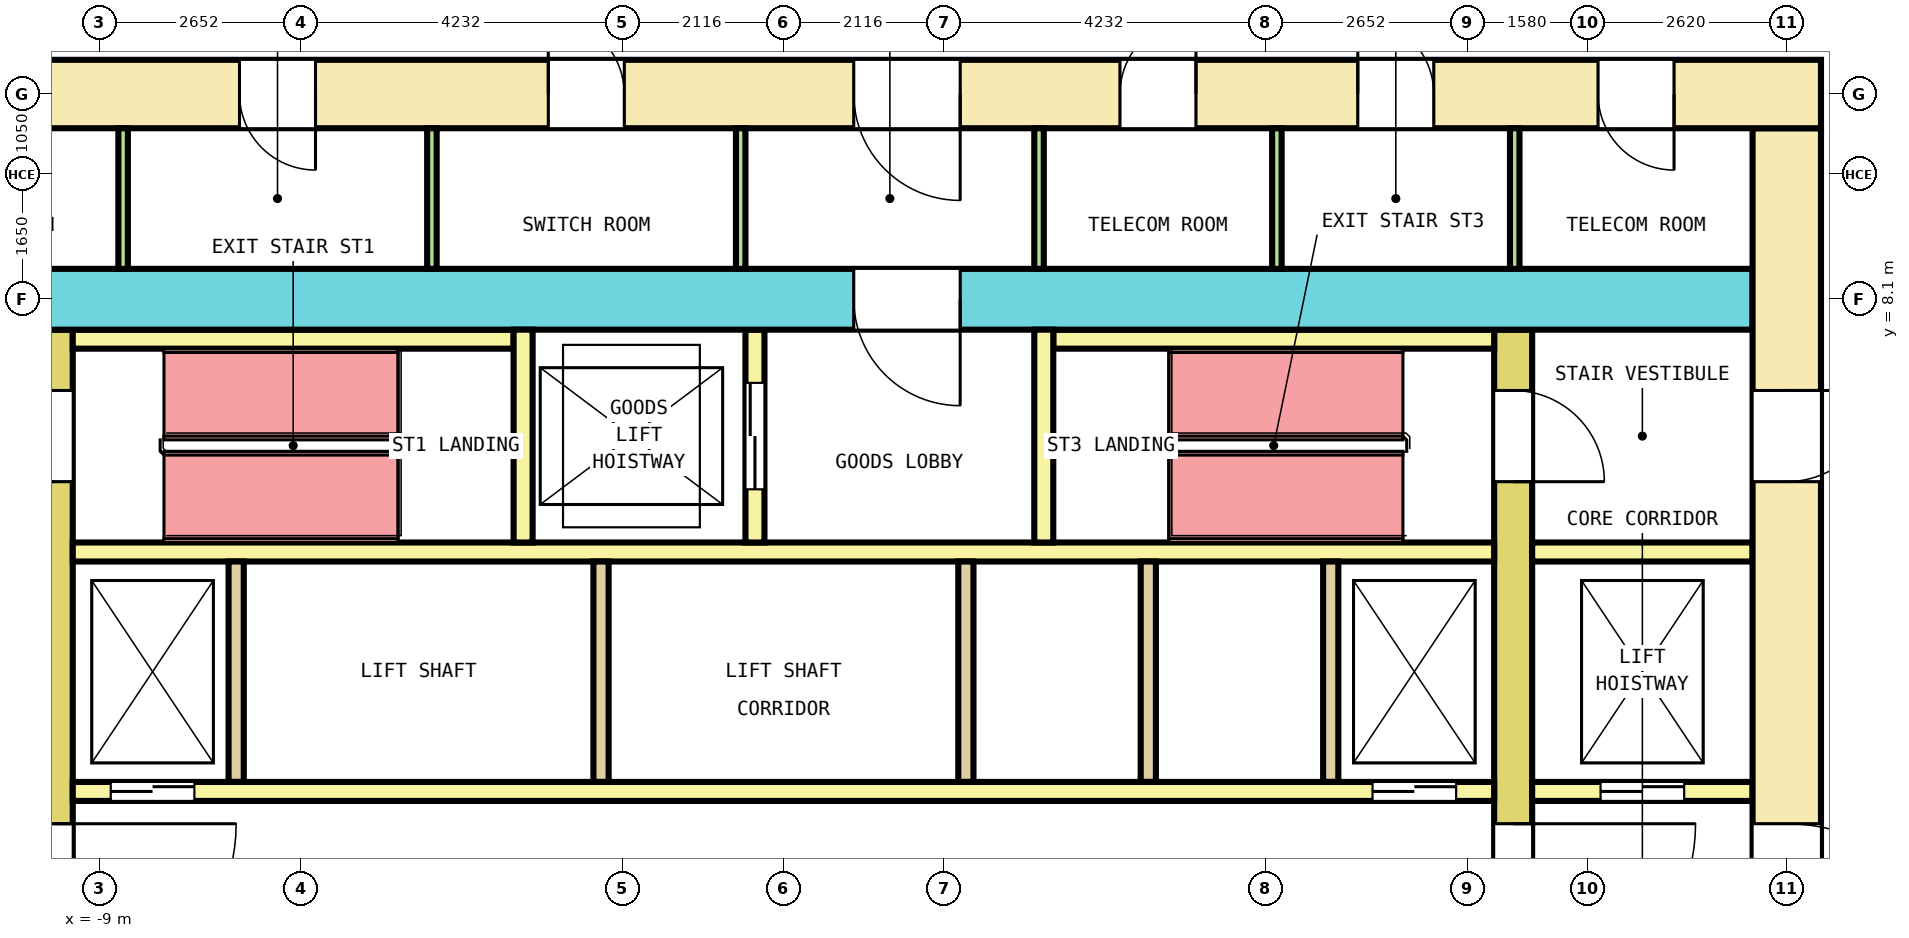
"""IFC4 building model, lengths in metres.
Left out: names, types, materials, properties, quantities, classifications, styles, units other than length and angle.
Written with IfcOpenShell. Run it as: python <this file> out.ifc"""

import sys

from ifc_helpers import new_model, si_unit, direction, frame, frame_2d, origin, place, context, subcontext, project, spatial, rectangle, extrude, element, fill, save


model = new_model("IFC4")
c1 = context("Model", 3, precision=1e-05, world=origin(), true_north=direction((0.0, 1.0)))
c2 = subcontext(c1, "Body", "Model", "MODEL_VIEW")
j1 = project(units=[si_unit("LENGTHUNIT", "METRE"), si_unit("PLANEANGLEUNIT", "RADIAN")], contexts=[c1])
p1 = place(None, origin())
s1 = spatial("IfcSite", under=j1, at=p1, CompositionType="ELEMENT")
p2 = place(p1, origin())
s2 = spatial("IfcBuilding", under=s1, at=p2, CompositionType="ELEMENT")
p3 = place(p2, frame((0.0, 0.0, 49.8)))
s3 = spatial("IfcBuildingStorey", under=s2, at=p3, CompositionType="ELEMENT", Elevation=49.8)
p4 = place(p3, frame((-13.65, 10.8, 0.0), z_axis=(0.0, 0.0, 1.0), x_axis=(1.0, 0.0, 0.0)))
e1 = element("IfcWall", 1, at=p4, inside=s3, PredefinedType="SHEAR", context=c2, shape_type="SweptSolid", body=[
    extrude(rectangle(XDim=27.3, YDim=0.9, at=frame_2d((13.65, 0.0))), origin(), (0.0, 0.0, 1.0), 4.1),
])
p5 = place(p4, frame((2.4, 0.0, 0.0)))
e2 = element("IfcOpeningElement", 2, at=p5, cuts=e1, PredefinedType="OPENING", context=c2, shape_type="SweptSolid", body=[
    extrude(rectangle(XDim=1.0, YDim=2.1, at=frame_2d((0.5, 1.05))), frame((0.0, 0.46, 0.0), z_axis=(0.0, -1.0, 0.0), x_axis=(1.0, 0.0, 0.0)), (0.0, 0.0, 1.0), 0.92),
])
p6 = place(p4, frame((6.494, 0.0, 0.0)))
e3 = element("IfcOpeningElement", 3, at=p6, cuts=e1, PredefinedType="OPENING", context=c2, shape_type="SweptSolid", body=[
    extrude(rectangle(XDim=1.0, YDim=2.1, at=frame_2d((0.5, 1.05))), frame((0.0, 0.46, 0.0), z_axis=(0.0, -1.0, 0.0), x_axis=(1.0, 0.0, 0.0)), (0.0, 0.0, 1.0), 0.92),
])
p7 = place(p4, frame((10.556, 0.0, 0.0)))
e4 = element("IfcOpeningElement", 4, at=p7, cuts=e1, PredefinedType="OPENING", context=c2, shape_type="SweptSolid", body=[
    extrude(rectangle(XDim=1.0, YDim=2.1, at=frame_2d((0.5, 1.05))), frame((0.0, 0.46, 0.0), z_axis=(0.0, -1.0, 0.0), x_axis=(1.0, 0.0, 0.0)), (0.0, 0.0, 1.0), 0.92),
])
p8 = place(p4, frame((18.077, 0.0, 0.0)))
e5 = element("IfcOpeningElement", 5, at=p8, cuts=e1, PredefinedType="OPENING", context=c2, shape_type="SweptSolid", body=[
    extrude(rectangle(XDim=1.0, YDim=2.1, at=frame_2d((0.5, 1.05))), frame((0.0, 0.46, 0.0), z_axis=(0.0, -1.0, 0.0), x_axis=(1.0, 0.0, 0.0)), (0.0, 0.0, 1.0), 0.92),
])
p9 = place(p4, frame((21.206, 0.0, 0.0)))
e6 = element("IfcOpeningElement", 6, at=p9, cuts=e1, PredefinedType="OPENING", context=c2, shape_type="SweptSolid", body=[
    extrude(rectangle(XDim=1.0, YDim=2.1, at=frame_2d((0.5, 1.05))), frame((0.0, 0.46, 0.0), z_axis=(0.0, -1.0, 0.0), x_axis=(1.0, 0.0, 0.0)), (0.0, 0.0, 1.0), 0.92),
])
p10 = place(p4, frame((24.367, 0.0, 0.0)))
e7 = element("IfcOpeningElement", 7, at=p10, cuts=e1, PredefinedType="OPENING", context=c2, shape_type="SweptSolid", body=[
    extrude(rectangle(XDim=1.0, YDim=2.1, at=frame_2d((0.5, 1.05))), frame((0.0, 0.46, 0.0), z_axis=(0.0, -1.0, 0.0), x_axis=(1.0, 0.0, 0.0)), (0.0, 0.0, 1.0), 0.92),
])
p11 = place(p4, frame((14.575, 0.0, 0.0)))
e8 = element("IfcOpeningElement", 8, at=p11, cuts=e1, PredefinedType="OPENING", context=c2, shape_type="SweptSolid", body=[
    extrude(rectangle(XDim=1.4, YDim=2.1, at=frame_2d((0.7, 1.05))), frame((0.0, 0.46, 0.0), z_axis=(0.0, -1.0, 0.0), x_axis=(1.0, 0.0, 0.0)), (0.0, 0.0, 1.0), 0.92),
])
p12 = place(p3, frame((13.2, -10.35, 0.0), z_axis=(0.0, 0.0, 1.0), x_axis=(0.0, 1.0, 0.0)))
e9 = element("IfcWall", 9, at=p12, inside=s3, PredefinedType="SHEAR", context=c2, shape_type="SweptSolid", body=[
    extrude(rectangle(XDim=20.7, YDim=0.9, at=frame_2d((10.35, 0.0))), origin(), (0.0, 0.0, 1.0), 4.1),
])
p13 = place(p12, frame((9.15, 0.0, 0.0)))
e10 = element("IfcOpeningElement", 10, at=p13, cuts=e9, PredefinedType="OPENING", context=c2, shape_type="SweptSolid", body=[
    extrude(rectangle(XDim=2.4, YDim=2.1, at=frame_2d((1.2, 1.05))), frame((0.0, 0.46, 0.0), z_axis=(0.0, -1.0, 0.0), x_axis=(1.0, 0.0, 0.0)), (0.0, 0.0, 1.0), 0.92),
])
p14 = place(p12, frame((16.05, 0.0, 0.0)))
e11 = element("IfcOpeningElement", 11, at=p14, cuts=e9, PredefinedType="OPENING", context=c2, shape_type="SweptSolid", body=[
    extrude(rectangle(XDim=1.2, YDim=2.1, at=frame_2d((0.6, 1.05))), frame((0.0, 0.46, 0.0), z_axis=(0.0, -1.0, 0.0), x_axis=(1.0, 0.0, 0.0)), (0.0, 0.0, 1.0), 0.92),
])
p15 = place(p12, frame((3.55, 0.0, 0.0)))
e12 = element("IfcOpeningElement", 12, at=p15, cuts=e9, PredefinedType="OPENING", context=c2, shape_type="SweptSolid", body=[
    extrude(rectangle(XDim=1.0, YDim=2.1, at=frame_2d((0.5, 1.05))), frame((0.0, 0.46, 0.0), z_axis=(0.0, -1.0, 0.0), x_axis=(1.0, 0.0, 0.0)), (0.0, 0.0, 1.0), 0.92),
])
p16 = place(p3, frame((-12.75, 8.1, 0.0), z_axis=(0.0, 0.0, 1.0), x_axis=(1.0, 0.0, 0.0)))
e13 = element("IfcWall", 13, at=p16, inside=s3, PredefinedType="SHEAR", context=c2, shape_type="SweptSolid", body=[
    extrude(rectangle(XDim=25.5, YDim=0.8, at=frame_2d((12.75, 0.0))), origin(), (0.0, 0.0, 1.0), 4.1),
])
p17 = place(p16, frame((13.675, 0.0, 0.0)))
e14 = element("IfcOpeningElement", 14, at=p17, cuts=e13, PredefinedType="OPENING", context=c2, shape_type="SweptSolid", body=[
    extrude(rectangle(XDim=1.4, YDim=2.1, at=frame_2d((0.7, 1.05))), frame((0.0, 0.41, 0.0), z_axis=(0.0, -1.0, 0.0), x_axis=(1.0, 0.0, 0.0)), (0.0, 0.0, 1.0), 0.82),
])
p18 = place(p3, frame((-9.6, -7.7, 0.0), z_axis=(0.0, 0.0, 1.0), x_axis=(0.0, 1.0, 0.0)))
e15 = element("IfcWall", 15, at=p18, inside=s3, PredefinedType="SHEAR", context=c2, shape_type="SweptSolid", body=[
    extrude(rectangle(XDim=15.4, YDim=0.5, at=frame_2d((7.7, 0.0))), origin(), (0.0, 0.0, 1.0), 4.1),
])
p19 = place(p18, frame((6.5, 0.0, 0.0)))
e16 = element("IfcOpeningElement", 16, at=p19, cuts=e15, PredefinedType="OPENING", context=c2, shape_type="SweptSolid", body=[
    extrude(rectangle(XDim=2.4, YDim=2.1, at=frame_2d((1.2, 1.05))), frame((0.0, 0.26, 0.0), z_axis=(0.0, -1.0, 0.0), x_axis=(1.0, 0.0, 0.0)), (0.0, 0.0, 1.0), 0.52),
])
p20 = place(p18, frame((13.4, 0.0, 0.0)))
e17 = element("IfcOpeningElement", 17, at=p20, cuts=e15, PredefinedType="OPENING", context=c2, shape_type="SweptSolid", body=[
    extrude(rectangle(XDim=1.2, YDim=2.1, at=frame_2d((0.6, 1.05))), frame((0.0, 0.26, 0.0), z_axis=(0.0, -1.0, 0.0), x_axis=(1.0, 0.0, 0.0)), (0.0, 0.0, 1.0), 0.52),
])
p21 = place(p18, frame((0.8, 0.0, 0.0)))
e18 = element("IfcOpeningElement", 18, at=p21, cuts=e15, PredefinedType="OPENING", context=c2, shape_type="SweptSolid", body=[
    extrude(rectangle(XDim=1.2, YDim=2.1, at=frame_2d((0.6, 1.05))), frame((0.0, 0.26, 0.0), z_axis=(0.0, -1.0, 0.0), x_axis=(1.0, 0.0, 0.0)), (0.0, 0.0, 1.0), 0.52),
])
p22 = place(p3, frame((9.6, -7.7, 0.0), z_axis=(0.0, 0.0, 1.0), x_axis=(0.0, 1.0, 0.0)))
e19 = element("IfcWall", 19, at=p22, inside=s3, PredefinedType="SHEAR", context=c2, shape_type="SweptSolid", body=[
    extrude(rectangle(XDim=15.4, YDim=0.5, at=frame_2d((7.7, 0.0))), origin(), (0.0, 0.0, 1.0), 4.1),
])
p23 = place(p22, frame((6.5, 0.0, 0.0)))
e20 = element("IfcOpeningElement", 20, at=p23, cuts=e19, PredefinedType="OPENING", context=c2, shape_type="SweptSolid", body=[
    extrude(rectangle(XDim=2.4, YDim=2.1, at=frame_2d((1.2, 1.05))), frame((0.0, 0.26, 0.0), z_axis=(0.0, -1.0, 0.0), x_axis=(1.0, 0.0, 0.0)), (0.0, 0.0, 1.0), 0.52),
])
p24 = place(p22, frame((13.4, 0.0, 0.0)))
e21 = element("IfcOpeningElement", 21, at=p24, cuts=e19, PredefinedType="OPENING", context=c2, shape_type="SweptSolid", body=[
    extrude(rectangle(XDim=1.2, YDim=2.1, at=frame_2d((0.6, 1.05))), frame((0.0, 0.26, 0.0), z_axis=(0.0, -1.0, 0.0), x_axis=(1.0, 0.0, 0.0)), (0.0, 0.0, 1.0), 0.52),
])
p25 = place(p22, frame((0.9, 0.0, 0.0)))
e22 = element("IfcOpeningElement", 22, at=p25, cuts=e19, PredefinedType="OPENING", context=c2, shape_type="SweptSolid", body=[
    extrude(rectangle(XDim=1.0, YDim=2.1, at=frame_2d((0.5, 1.05))), frame((0.0, 0.26, 0.0), z_axis=(0.0, -1.0, 0.0), x_axis=(1.0, 0.0, 0.0)), (0.0, 0.0, 1.0), 0.52),
])
p26 = place(p3, frame((-9.35, 1.625, 0.0), z_axis=(0.0, 0.0, 1.0), x_axis=(1.0, 0.0, 0.0)))
e23 = element("IfcWall", 23, at=p26, inside=s3, PredefinedType="SOLIDWALL", context=c2, shape_type="SweptSolid", body=[
    extrude(rectangle(XDim=18.7, YDim=0.25, at=frame_2d((9.35, 0.0))), origin(), (0.0, 0.0, 1.0), 4.1),
])
p27 = place(p26, frame((0.5, 0.0, 0.0)))
e24 = element("IfcOpeningElement", 24, at=p27, cuts=e23, PredefinedType="OPENING", context=c2, shape_type="SweptSolid", body=[
    extrude(rectangle(XDim=1.1, YDim=2.1, at=frame_2d((0.55, 1.05))), frame((0.0, 0.135, 0.0), z_axis=(0.0, -1.0, 0.0), x_axis=(1.0, 0.0, 0.0)), (0.0, 0.0, 1.0), 0.27),
])
p28 = place(p26, frame((17.1, 0.0, 0.0)))
e25 = element("IfcOpeningElement", 25, at=p28, cuts=e23, PredefinedType="OPENING", context=c2, shape_type="SweptSolid", body=[
    extrude(rectangle(XDim=1.1, YDim=2.1, at=frame_2d((0.55, 1.05))), frame((0.0, 0.135, 0.0), z_axis=(0.0, -1.0, 0.0), x_axis=(1.0, 0.0, 0.0)), (0.0, 0.0, 1.0), 0.27),
])
p29 = place(p3, frame((9.85, 1.625, 0.0), z_axis=(0.0, 0.0, 1.0), x_axis=(1.0, 0.0, 0.0)))
e26 = element("IfcWall", 26, at=p29, inside=s3, PredefinedType="SOLIDWALL", context=c2, shape_type="SweptSolid", body=[
    extrude(rectangle(XDim=2.9, YDim=0.25, at=frame_2d((1.45, 0.0))), origin(), (0.0, 0.0, 1.0), 4.1),
])
p30 = place(p29, frame((0.9, 0.0, 0.0)))
e27 = element("IfcOpeningElement", 27, at=p30, cuts=e26, PredefinedType="OPENING", context=c2, shape_type="SweptSolid", body=[
    extrude(rectangle(XDim=1.1, YDim=2.1, at=frame_2d((0.55, 1.05))), frame((0.0, 0.135, 0.0), z_axis=(0.0, -1.0, 0.0), x_axis=(1.0, 0.0, 0.0)), (0.0, 0.0, 1.0), 0.27),
])
p31 = place(p3, frame((-9.35, 4.775, 0.0), z_axis=(0.0, 0.0, 1.0), x_axis=(1.0, 0.0, 0.0)))
e28 = element("IfcWall", 28, at=p31, inside=s3, PredefinedType="SOLIDWALL", context=c2, shape_type="SweptSolid", body=[
    extrude(rectangle(XDim=18.7, YDim=0.25, at=frame_2d((9.35, 0.0))), origin(), (0.0, 0.0, 1.0), 4.1),
])
p32 = place(p3, frame((9.85, 4.775, 0.0), z_axis=(0.0, 0.0, 1.0), x_axis=(1.0, 0.0, 0.0)))
e29 = element("IfcWall", 29, at=p32, inside=s3, PredefinedType="SOLIDWALL", context=c2, shape_type="SweptSolid", body=[
    extrude(rectangle(XDim=2.9, YDim=0.25, at=frame_2d((1.45, 0.0))), origin(), (0.0, 0.0, 1.0), 4.1),
])
for number, where, z_axis, x_axis in (
    (30, (-7.2, 1.75, 0.0), (0.0, 0.0, 1.0), (0.0, 1.0, 0.0)),
    (31, (-2.4, 1.75, 0.0), (0.0, 0.0, 1.0), (0.0, 1.0, 0.0)),
    (32, (2.4, 1.75, 0.0), (0.0, 0.0, 1.0), (0.0, 1.0, 0.0)),
    (33, (4.8, 1.75, 0.0), (0.0, 0.0, 1.0), (0.0, 1.0, 0.0)),
    (34, (7.2, 1.75, 0.0), (0.0, 0.0, 1.0), (0.0, 1.0, 0.0)),
):
    element("IfcWall", number, at=place(p3, frame(where, z_axis=z_axis, x_axis=x_axis)), inside=s3, PredefinedType="SOLIDWALL", context=c2, shape_type="SweptSolid", body=[
        extrude(rectangle(XDim=2.9, YDim=0.2, at=frame_2d((1.45, 0.0))), origin(), (0.0, 0.0, 1.0), 4.1),
    ])
for number, where, z_axis, x_axis in (
    (35, (-9.35, 7.575, 0.0), (0.0, 0.0, 1.0), (1.0, 0.0, 0.0)),
    (36, (3.55, 7.575, 0.0), (0.0, 0.0, 1.0), (1.0, 0.0, 0.0)),
):
    element("IfcWall", number, at=place(p3, frame(where, z_axis=z_axis, x_axis=x_axis)), inside=s3, PredefinedType="SOLIDWALL", context=c2, shape_type="SweptSolid", body=[
        extrude(rectangle(XDim=5.8, YDim=0.25, at=frame_2d((2.9, 0.0))), origin(), (0.0, 0.0, 1.0), 4.1),
    ])
p33 = place(p3, frame((-3.425, 4.9, 0.0), z_axis=(0.0, 0.0, 1.0), x_axis=(0.0, 1.0, 0.0)))
e37 = element("IfcWall", 37, at=p33, inside=s3, PredefinedType="SOLIDWALL", context=c2, shape_type="SweptSolid", body=[
    extrude(rectangle(XDim=2.8, YDim=0.25, at=frame_2d((1.4, 0.0))), origin(), (0.0, 0.0, 1.0), 4.1),
])
p34 = place(p3, frame((-0.375, 4.9, 0.0), z_axis=(0.0, 0.0, 1.0), x_axis=(0.0, 1.0, 0.0)))
e38 = element("IfcWall", 38, at=p34, inside=s3, PredefinedType="SOLIDWALL", context=c2, shape_type="SweptSolid", body=[
    extrude(rectangle(XDim=2.8, YDim=0.25, at=frame_2d((1.4, 0.0))), origin(), (0.0, 0.0, 1.0), 4.1),
])
p35 = place(p34, frame((0.7, 0.0, 0.0)))
e39 = element("IfcOpeningElement", 39, at=p35, cuts=e38, PredefinedType="OPENING", context=c2, shape_type="SweptSolid", body=[
    extrude(rectangle(XDim=1.4, YDim=2.1, at=frame_2d((0.7, 1.05))), frame((0.0, 0.135, 0.0), z_axis=(0.0, -1.0, 0.0), x_axis=(1.0, 0.0, 0.0)), (0.0, 0.0, 1.0), 0.27),
])
p36 = place(p3, frame((3.425, 4.9, 0.0), z_axis=(0.0, 0.0, 1.0), x_axis=(0.0, 1.0, 0.0)))
e40 = element("IfcWall", 40, at=p36, inside=s3, PredefinedType="SOLIDWALL", context=c2, shape_type="SweptSolid", body=[
    extrude(rectangle(XDim=2.8, YDim=0.25, at=frame_2d((1.4, 0.0))), origin(), (0.0, 0.0, 1.0), 4.1),
])
for number, where, z_axis, x_axis in (
    (41, (-8.688, 8.5, 0.0), (0.0, 0.0, 1.0), (0.0, 1.0, 0.0)),
    (42, (-4.625, 8.5, 0.0), (0.0, 0.0, 1.0), (0.0, 1.0, 0.0)),
    (43, (-0.562, 8.5, 0.0), (0.0, 0.0, 1.0), (0.0, 1.0, 0.0)),
    (44, (3.363, 8.5, 0.0), (0.0, 0.0, 1.0), (0.0, 1.0, 0.0)),
    (45, (6.492, 8.5, 0.0), (0.0, 0.0, 1.0), (0.0, 1.0, 0.0)),
    (46, (9.621, 8.5, 0.0), (0.0, 0.0, 1.0), (0.0, 1.0, 0.0)),
):
    element("IfcWall", number, at=place(p3, frame(where, z_axis=z_axis, x_axis=x_axis)), inside=s3, PredefinedType="PARTITIONING", context=c2, shape_type="SweptSolid", body=[
        extrude(rectangle(XDim=1.85, YDim=0.125, at=frame_2d((0.925, 0.0))), origin(), (0.0, 0.0, 1.0), 4.1),
    ])
p37 = place(p27, origin())
e47 = element("IfcDoor", 47, at=p37, inside=s3, OperationType="DOUBLE_DOOR_SLIDING", PredefinedType="DOOR", context=c2, shape_type="SweptSolid", body=[
    extrude(rectangle(XDim=1.1, YDim=2.1, at=frame_2d((0.55, 1.05))), frame((0.0, 0.075, 0.0), z_axis=(0.0, -1.0, 0.0), x_axis=(1.0, 0.0, 0.0)), (0.0, 0.0, 1.0), 0.15),
])
fill(e24, e47)
p38 = place(p28, origin())
e48 = element("IfcDoor", 48, at=p38, inside=s3, OperationType="DOUBLE_DOOR_SLIDING", PredefinedType="DOOR", context=c2, shape_type="SweptSolid", body=[
    extrude(rectangle(XDim=1.1, YDim=2.1, at=frame_2d((0.55, 1.05))), frame((0.0, 0.075, 0.0), z_axis=(0.0, -1.0, 0.0), x_axis=(1.0, 0.0, 0.0)), (0.0, 0.0, 1.0), 0.15),
])
fill(e25, e48)
p39 = place(p30, origin())
e49 = element("IfcDoor", 49, at=p39, inside=s3, OperationType="DOUBLE_DOOR_SLIDING", PredefinedType="DOOR", context=c2, shape_type="SweptSolid", body=[
    extrude(rectangle(XDim=1.1, YDim=2.1, at=frame_2d((0.55, 1.05))), frame((0.0, 0.075, 0.0), z_axis=(0.0, -1.0, 0.0), x_axis=(1.0, 0.0, 0.0)), (0.0, 0.0, 1.0), 0.15),
])
fill(e27, e49)
p40 = place(p35, origin())
e50 = element("IfcDoor", 50, at=p40, inside=s3, OperationType="DOUBLE_DOOR_SLIDING", PredefinedType="DOOR", context=c2, shape_type="SweptSolid", body=[
    extrude(rectangle(XDim=1.4, YDim=2.1, at=frame_2d((0.7, 1.05))), frame((0.0, 0.075, 0.0), z_axis=(0.0, -1.0, 0.0), x_axis=(1.0, 0.0, 0.0)), (0.0, 0.0, 1.0), 0.15),
])
fill(e39, e50)
p41 = place(p19, origin())
e51 = element("IfcDoor", 51, at=p41, inside=s3, OperationType="DOUBLE_DOOR_SINGLE_SWING", PredefinedType="DOOR", context=c2, shape_type="SweptSolid", body=[
    extrude(rectangle(XDim=2.4, YDim=2.1, at=frame_2d((1.2, 1.05))), frame((0.0, 0.2, 0.0), z_axis=(0.0, -1.0, 0.0), x_axis=(1.0, 0.0, 0.0)), (0.0, 0.0, 1.0), 0.4),
])
fill(e16, e51)
p42 = place(p23, origin())
e52 = element("IfcDoor", 52, at=p42, inside=s3, OperationType="DOUBLE_DOOR_SINGLE_SWING", PredefinedType="DOOR", context=c2, shape_type="SweptSolid", body=[
    extrude(rectangle(XDim=2.4, YDim=2.1, at=frame_2d((1.2, 1.05))), frame((0.0, 0.2, 0.0), z_axis=(0.0, -1.0, 0.0), x_axis=(1.0, 0.0, 0.0)), (0.0, 0.0, 1.0), 0.4),
])
fill(e20, e52)
p43 = place(p13, origin())
e53 = element("IfcDoor", 53, at=p43, inside=s3, OperationType="DOUBLE_DOOR_SINGLE_SWING", PredefinedType="DOOR", context=c2, shape_type="SweptSolid", body=[
    extrude(rectangle(XDim=2.4, YDim=2.1, at=frame_2d((1.2, 1.05))), frame((0.0, 0.3, 0.0), z_axis=(0.0, -1.0, 0.0), x_axis=(1.0, 0.0, 0.0)), (0.0, 0.0, 1.0), 0.6),
])
fill(e10, e53)
p44 = place(p20, origin())
e54 = element("IfcDoor", 54, at=p44, inside=s3, OperationType="SINGLE_SWING_RIGHT", PredefinedType="DOOR", context=c2, shape_type="SweptSolid", body=[
    extrude(rectangle(XDim=1.2, YDim=2.1, at=frame_2d((0.6, 1.05))), frame((0.0, 0.2, 0.0), z_axis=(0.0, -1.0, 0.0), x_axis=(1.0, 0.0, 0.0)), (0.0, 0.0, 1.0), 0.4),
])
fill(e17, e54)
p45 = place(p24, origin())
e55 = element("IfcDoor", 55, at=p45, inside=s3, OperationType="SINGLE_SWING_RIGHT", PredefinedType="DOOR", context=c2, shape_type="SweptSolid", body=[
    extrude(rectangle(XDim=1.2, YDim=2.1, at=frame_2d((0.6, 1.05))), frame((0.0, 0.2, 0.0), z_axis=(0.0, -1.0, 0.0), x_axis=(1.0, 0.0, 0.0)), (0.0, 0.0, 1.0), 0.4),
])
fill(e21, e55)
p46 = place(p14, origin())
e56 = element("IfcDoor", 56, at=p46, inside=s3, OperationType="SINGLE_SWING_LEFT", PredefinedType="DOOR", context=c2, shape_type="SweptSolid", body=[
    extrude(rectangle(XDim=1.2, YDim=2.1, at=frame_2d((0.6, 1.05))), frame((0.0, 0.3, 0.0), z_axis=(0.0, -1.0, 0.0), x_axis=(1.0, 0.0, 0.0)), (0.0, 0.0, 1.0), 0.6),
])
fill(e11, e56)
p47 = place(p17, origin())
e57 = element("IfcDoor", 57, at=p47, inside=s3, OperationType="DOUBLE_DOOR_SINGLE_SWING", PredefinedType="DOOR", context=c2, shape_type="SweptSolid", body=[
    extrude(rectangle(XDim=1.4, YDim=2.1, at=frame_2d((0.7, 1.05))), frame((0.0, 0.3, 0.0), z_axis=(0.0, -1.0, 0.0), x_axis=(1.0, 0.0, 0.0)), (0.0, 0.0, 1.0), 0.6),
])
fill(e14, e57)
p48 = place(p6, origin())
e58 = element("IfcDoor", 58, at=p48, inside=s3, OperationType="SINGLE_SWING_LEFT", PredefinedType="DOOR", context=c2, shape_type="SweptSolid", body=[
    extrude(rectangle(XDim=1.0, YDim=2.1, at=frame_2d((0.5, 1.05))), frame((0.0, 0.3, 0.0), z_axis=(0.0, -1.0, 0.0), x_axis=(1.0, 0.0, 0.0)), (0.0, 0.0, 1.0), 0.6),
])
fill(e3, e58)
p49 = place(p7, origin())
e59 = element("IfcDoor", 59, at=p49, inside=s3, OperationType="SINGLE_SWING_RIGHT", PredefinedType="DOOR", context=c2, shape_type="SweptSolid", body=[
    extrude(rectangle(XDim=1.0, YDim=2.1, at=frame_2d((0.5, 1.05))), frame((0.0, 0.3, 0.0), z_axis=(0.0, -1.0, 0.0), x_axis=(1.0, 0.0, 0.0)), (0.0, 0.0, 1.0), 0.6),
])
fill(e4, e59)
p50 = place(p8, origin())
e60 = element("IfcDoor", 60, at=p50, inside=s3, OperationType="SINGLE_SWING_LEFT", PredefinedType="DOOR", context=c2, shape_type="SweptSolid", body=[
    extrude(rectangle(XDim=1.0, YDim=2.1, at=frame_2d((0.5, 1.05))), frame((0.0, 0.3, 0.0), z_axis=(0.0, -1.0, 0.0), x_axis=(1.0, 0.0, 0.0)), (0.0, 0.0, 1.0), 0.6),
])
fill(e5, e60)
p51 = place(p9, origin())
e61 = element("IfcDoor", 61, at=p51, inside=s3, OperationType="SINGLE_SWING_RIGHT", PredefinedType="DOOR", context=c2, shape_type="SweptSolid", body=[
    extrude(rectangle(XDim=1.0, YDim=2.1, at=frame_2d((0.5, 1.05))), frame((0.0, 0.3, 0.0), z_axis=(0.0, -1.0, 0.0), x_axis=(1.0, 0.0, 0.0)), (0.0, 0.0, 1.0), 0.6),
])
fill(e6, e61)
p52 = place(p10, origin())
e62 = element("IfcDoor", 62, at=p52, inside=s3, OperationType="SINGLE_SWING_LEFT", PredefinedType="DOOR", context=c2, shape_type="SweptSolid", body=[
    extrude(rectangle(XDim=1.0, YDim=2.1, at=frame_2d((0.5, 1.05))), frame((0.0, 0.3, 0.0), z_axis=(0.0, -1.0, 0.0), x_axis=(1.0, 0.0, 0.0)), (0.0, 0.0, 1.0), 0.6),
])
fill(e7, e62)
p53 = place(p11, origin())
e63 = element("IfcDoor", 63, at=p53, inside=s3, OperationType="DOUBLE_DOOR_SINGLE_SWING", PredefinedType="DOOR", context=c2, shape_type="SweptSolid", body=[
    extrude(rectangle(XDim=1.4, YDim=2.1, at=frame_2d((0.7, 1.05))), frame((0.0, 0.3, 0.0), z_axis=(0.0, -1.0, 0.0), x_axis=(1.0, 0.0, 0.0)), (0.0, 0.0, 1.0), 0.6),
])
fill(e8, e63)
save(model, sys.argv[1])
